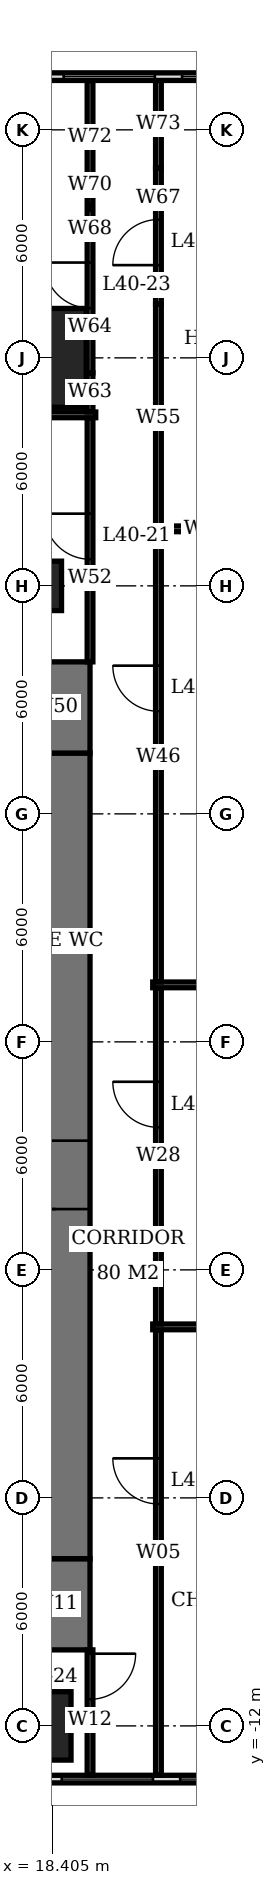
"""IFC4 building model, lengths in metres.
Left out: names, types, materials, properties, quantities, classifications, styles, units other than length and angle.
Written with IfcOpenShell. Run it as: python <this file> out.ifc"""

import sys

from ifc_helpers import new_model, si_unit, direction, frame, frame_2d, origin, origin_2d, place, context, subcontext, project, spatial, rectangle, extrude, element, fill, save


model = new_model("IFC4")
c1 = context("Model", 3, precision=1e-05, world=origin(), true_north=direction((0.0, 1.0)))
c2 = subcontext(c1, "Body", "Model", "MODEL_VIEW")
j1 = project(units=[si_unit("LENGTHUNIT", "METRE"), si_unit("PLANEANGLEUNIT", "RADIAN")], contexts=[c1])
p1 = place(None, origin())
s1 = spatial("IfcSite", under=j1, at=p1, CompositionType="ELEMENT")
p2 = place(p1, origin())
s2 = spatial("IfcBuilding", under=s1, at=p2, CompositionType="ELEMENT")
p3 = place(p2, frame((0.0, 0.0, 164.0)))
s3 = spatial("IfcBuildingStorey", under=s2, at=p3, CompositionType="ELEMENT", Elevation=164.0)
p4 = place(p3, frame((18.0, -12.0, 0.0), z_axis=(0.0, 0.0, 1.0), x_axis=(1.0, 0.0, 0.0)))
e1 = element("IfcColumn", 1, at=p4, inside=s3, PredefinedType="COLUMN", context=c2, shape_type="SweptSolid", body=[
    extrude(rectangle(XDim=1.8, YDim=1.8, at=origin_2d()), origin(), (0.0, 0.0, 1.0), 5.4),
])
p5 = place(p3, frame((18.0, 18.0, 0.0), z_axis=(0.0, 0.0, 1.0), x_axis=(1.0, 0.0, 0.0)))
e2 = element("IfcColumn", 2, at=p5, inside=s3, PredefinedType="COLUMN", context=c2, shape_type="SweptSolid", body=[
    extrude(rectangle(XDim=1.3, YDim=1.3, at=origin_2d()), origin(), (0.0, 0.0, 1.0), 5.4),
])
p6 = place(p3, frame((18.0, 24.0, 0.0), z_axis=(0.0, 0.0, 1.0), x_axis=(1.0, 0.0, 0.0)))
e3 = element("IfcColumn", 3, at=p6, inside=s3, PredefinedType="COLUMN", context=c2, shape_type="SweptSolid", body=[
    extrude(rectangle(XDim=2.6, YDim=2.6, at=origin_2d()), origin(), (0.0, 0.0, 1.0), 5.4),
])
p7 = place(p3, frame((18.5, -7.6, 0.0), z_axis=(0.0, 0.0, 1.0), x_axis=(0.0, 1.0, 0.0)))
e4 = element("IfcWall", 4, at=p7, inside=s3, PredefinedType="SHEAR", context=c2, shape_type="SweptSolid", body=[
    extrude(rectangle(XDim=21.2, YDim=1.8, at=frame_2d((10.6, 0.0))), origin(), (0.0, 0.0, 1.0), 5.4),
])
p8 = place(p7, frame((9.2, 0.0, 0.0)))
e5 = element("IfcOpeningElement", 5, at=p8, cuts=e4, PredefinedType="OPENING", context=c2, shape_type="SweptSolid", body=[
    extrude(rectangle(XDim=1.8, YDim=2.4, at=frame_2d((0.9, 1.2))), frame((0.0, 0.91, 0.0), z_axis=(0.0, -1.0, 0.0), x_axis=(1.0, 0.0, 0.0)), (0.0, 0.0, 1.0), 1.82),
])
for number, where, z_axis, x_axis in (
    (6, (18.5, -10.0, 0.0), (0.0, 0.0, 1.0), (0.0, 1.0, 0.0)),
    (7, (18.5, 13.6, 0.0), (0.0, 0.0, 1.0), (0.0, 1.0, 0.0)),
):
    element("IfcWall", number, at=place(p3, frame(where, z_axis=z_axis, x_axis=x_axis)), inside=s3, PredefinedType="SHEAR", context=c2, shape_type="SweptSolid", body=[
        extrude(rectangle(XDim=2.4, YDim=1.8, at=frame_2d((1.2, 0.0))), origin(), (0.0, 0.0, 1.0), 5.4),
    ])
p9 = place(p3, frame((-6.63, -13.4, 0.0), z_axis=(0.0, 0.0, 1.0), x_axis=(1.0, 0.0, 0.0)))
e8 = element("IfcWall", 8, at=p9, inside=s3, PredefinedType="USERDEFINED", context=c2, shape_type="SweptSolid", body=[
    extrude(rectangle(XDim=31.26, YDim=0.2, at=frame_2d((15.63, 0.0))), origin(), (0.0, 0.0, 1.0), 5.4),
])
p10 = place(p9, frame((0.358, 0.0, 0.6)))
e9 = element("IfcOpeningElement", 9, at=p10, cuts=e8, PredefinedType="OPENING", context=c2, shape_type="SweptSolid", body=[
    extrude(rectangle(XDim=2.4, YDim=3.0, at=frame_2d((1.2, 1.5))), frame((0.0, 0.11, 0.0), z_axis=(0.0, -1.0, 0.0), x_axis=(1.0, 0.0, 0.0)), (0.0, 0.0, 1.0), 0.22),
])
p11 = place(p9, frame((3.474, 0.0, 0.6)))
e10 = element("IfcOpeningElement", 10, at=p11, cuts=e8, PredefinedType="OPENING", context=c2, shape_type="SweptSolid", body=[
    extrude(rectangle(XDim=2.4, YDim=3.0, at=frame_2d((1.2, 1.5))), frame((0.0, 0.11, 0.0), z_axis=(0.0, -1.0, 0.0), x_axis=(1.0, 0.0, 0.0)), (0.0, 0.0, 1.0), 0.22),
])
p12 = place(p9, frame((6.59, 0.0, 0.6)))
e11 = element("IfcOpeningElement", 11, at=p12, cuts=e8, PredefinedType="OPENING", context=c2, shape_type="SweptSolid", body=[
    extrude(rectangle(XDim=2.4, YDim=3.0, at=frame_2d((1.2, 1.5))), frame((0.0, 0.11, 0.0), z_axis=(0.0, -1.0, 0.0), x_axis=(1.0, 0.0, 0.0)), (0.0, 0.0, 1.0), 0.22),
])
p13 = place(p9, frame((9.706, 0.0, 0.6)))
e12 = element("IfcOpeningElement", 12, at=p13, cuts=e8, PredefinedType="OPENING", context=c2, shape_type="SweptSolid", body=[
    extrude(rectangle(XDim=2.4, YDim=3.0, at=frame_2d((1.2, 1.5))), frame((0.0, 0.11, 0.0), z_axis=(0.0, -1.0, 0.0), x_axis=(1.0, 0.0, 0.0)), (0.0, 0.0, 1.0), 0.22),
])
p14 = place(p9, frame((13.572, 0.0, 0.0)))
e13 = element("IfcOpeningElement", 13, at=p14, cuts=e8, PredefinedType="OPENING", context=c2, shape_type="SweptSolid", body=[
    extrude(rectangle(XDim=1.0, YDim=2.1, at=frame_2d((0.5, 1.05))), frame((0.0, 0.11, 0.0), z_axis=(0.0, -1.0, 0.0), x_axis=(1.0, 0.0, 0.0)), (0.0, 0.0, 1.0), 0.22),
])
p15 = place(p9, frame((15.938, 0.0, 0.6)))
e14 = element("IfcOpeningElement", 14, at=p15, cuts=e8, PredefinedType="OPENING", context=c2, shape_type="SweptSolid", body=[
    extrude(rectangle(XDim=2.4, YDim=3.0, at=frame_2d((1.2, 1.5))), frame((0.0, 0.11, 0.0), z_axis=(0.0, -1.0, 0.0), x_axis=(1.0, 0.0, 0.0)), (0.0, 0.0, 1.0), 0.22),
])
p16 = place(p9, frame((19.054, 0.0, 0.6)))
e15 = element("IfcOpeningElement", 15, at=p16, cuts=e8, PredefinedType="OPENING", context=c2, shape_type="SweptSolid", body=[
    extrude(rectangle(XDim=2.4, YDim=3.0, at=frame_2d((1.2, 1.5))), frame((0.0, 0.11, 0.0), z_axis=(0.0, -1.0, 0.0), x_axis=(1.0, 0.0, 0.0)), (0.0, 0.0, 1.0), 0.22),
])
p17 = place(p9, frame((22.17, 0.0, 0.6)))
e16 = element("IfcOpeningElement", 16, at=p17, cuts=e8, PredefinedType="OPENING", context=c2, shape_type="SweptSolid", body=[
    extrude(rectangle(XDim=2.4, YDim=3.0, at=frame_2d((1.2, 1.5))), frame((0.0, 0.11, 0.0), z_axis=(0.0, -1.0, 0.0), x_axis=(1.0, 0.0, 0.0)), (0.0, 0.0, 1.0), 0.22),
])
p18 = place(p9, frame((25.286, 0.0, 0.6)))
e17 = element("IfcOpeningElement", 17, at=p18, cuts=e8, PredefinedType="OPENING", context=c2, shape_type="SweptSolid", body=[
    extrude(rectangle(XDim=2.4, YDim=3.0, at=frame_2d((1.2, 1.5))), frame((0.0, 0.11, 0.0), z_axis=(0.0, -1.0, 0.0), x_axis=(1.0, 0.0, 0.0)), (0.0, 0.0, 1.0), 0.22),
])
p19 = place(p9, frame((28.402, 0.0, 0.6)))
e18 = element("IfcOpeningElement", 18, at=p19, cuts=e8, PredefinedType="OPENING", context=c2, shape_type="SweptSolid", body=[
    extrude(rectangle(XDim=2.4, YDim=3.0, at=frame_2d((1.2, 1.5))), frame((0.0, 0.11, 0.0), z_axis=(0.0, -1.0, 0.0), x_axis=(1.0, 0.0, 0.0)), (0.0, 0.0, 1.0), 0.22),
])
p20 = place(p3, frame((24.58, 31.4, 0.0), z_axis=(0.0, 0.0, 1.0), x_axis=(-1.0, 0.0, 0.0)))
e19 = element("IfcWall", 19, at=p20, inside=s3, PredefinedType="USERDEFINED", context=c2, shape_type="SweptSolid", body=[
    extrude(rectangle(XDim=31.16, YDim=0.2, at=frame_2d((15.58, 0.0))), origin(), (0.0, 0.0, 1.0), 5.4),
])
p21 = place(p20, frame((0.358, 0.0, 0.6)))
e20 = element("IfcOpeningElement", 20, at=p21, cuts=e19, PredefinedType="OPENING", context=c2, shape_type="SweptSolid", body=[
    extrude(rectangle(XDim=2.4, YDim=3.0, at=frame_2d((1.2, 1.5))), frame((0.0, 0.11, 0.0), z_axis=(0.0, -1.0, 0.0), x_axis=(1.0, 0.0, 0.0)), (0.0, 0.0, 1.0), 0.22),
])
p22 = place(p20, frame((3.474, 0.0, 0.6)))
e21 = element("IfcOpeningElement", 21, at=p22, cuts=e19, PredefinedType="OPENING", context=c2, shape_type="SweptSolid", body=[
    extrude(rectangle(XDim=2.4, YDim=3.0, at=frame_2d((1.2, 1.5))), frame((0.0, 0.11, 0.0), z_axis=(0.0, -1.0, 0.0), x_axis=(1.0, 0.0, 0.0)), (0.0, 0.0, 1.0), 0.22),
])
p23 = place(p20, frame((6.59, 0.0, 0.6)))
e22 = element("IfcOpeningElement", 22, at=p23, cuts=e19, PredefinedType="OPENING", context=c2, shape_type="SweptSolid", body=[
    extrude(rectangle(XDim=2.4, YDim=3.0, at=frame_2d((1.2, 1.5))), frame((0.0, 0.11, 0.0), z_axis=(0.0, -1.0, 0.0), x_axis=(1.0, 0.0, 0.0)), (0.0, 0.0, 1.0), 0.22),
])
p24 = place(p20, frame((9.706, 0.0, 0.6)))
e23 = element("IfcOpeningElement", 23, at=p24, cuts=e19, PredefinedType="OPENING", context=c2, shape_type="SweptSolid", body=[
    extrude(rectangle(XDim=2.4, YDim=3.0, at=frame_2d((1.2, 1.5))), frame((0.0, 0.11, 0.0), z_axis=(0.0, -1.0, 0.0), x_axis=(1.0, 0.0, 0.0)), (0.0, 0.0, 1.0), 0.22),
])
p25 = place(p20, frame((12.822, 0.0, 0.6)))
e24 = element("IfcOpeningElement", 24, at=p25, cuts=e19, PredefinedType="OPENING", context=c2, shape_type="SweptSolid", body=[
    extrude(rectangle(XDim=2.4, YDim=3.0, at=frame_2d((1.2, 1.5))), frame((0.0, 0.11, 0.0), z_axis=(0.0, -1.0, 0.0), x_axis=(1.0, 0.0, 0.0)), (0.0, 0.0, 1.0), 0.22),
])
p26 = place(p20, frame((15.938, 0.0, 0.6)))
e25 = element("IfcOpeningElement", 25, at=p26, cuts=e19, PredefinedType="OPENING", context=c2, shape_type="SweptSolid", body=[
    extrude(rectangle(XDim=2.4, YDim=3.0, at=frame_2d((1.2, 1.5))), frame((0.0, 0.11, 0.0), z_axis=(0.0, -1.0, 0.0), x_axis=(1.0, 0.0, 0.0)), (0.0, 0.0, 1.0), 0.22),
])
p27 = place(p20, frame((19.054, 0.0, 0.6)))
e26 = element("IfcOpeningElement", 26, at=p27, cuts=e19, PredefinedType="OPENING", context=c2, shape_type="SweptSolid", body=[
    extrude(rectangle(XDim=2.4, YDim=3.0, at=frame_2d((1.2, 1.5))), frame((0.0, 0.11, 0.0), z_axis=(0.0, -1.0, 0.0), x_axis=(1.0, 0.0, 0.0)), (0.0, 0.0, 1.0), 0.22),
])
p28 = place(p20, frame((22.17, 0.0, 0.6)))
e27 = element("IfcOpeningElement", 27, at=p28, cuts=e19, PredefinedType="OPENING", context=c2, shape_type="SweptSolid", body=[
    extrude(rectangle(XDim=2.4, YDim=3.0, at=frame_2d((1.2, 1.5))), frame((0.0, 0.11, 0.0), z_axis=(0.0, -1.0, 0.0), x_axis=(1.0, 0.0, 0.0)), (0.0, 0.0, 1.0), 0.22),
])
p29 = place(p20, frame((25.286, 0.0, 0.6)))
e28 = element("IfcOpeningElement", 28, at=p29, cuts=e19, PredefinedType="OPENING", context=c2, shape_type="SweptSolid", body=[
    extrude(rectangle(XDim=2.4, YDim=3.0, at=frame_2d((1.2, 1.5))), frame((0.0, 0.11, 0.0), z_axis=(0.0, -1.0, 0.0), x_axis=(1.0, 0.0, 0.0)), (0.0, 0.0, 1.0), 0.22),
])
p30 = place(p20, frame((28.402, 0.0, 0.6)))
e29 = element("IfcOpeningElement", 29, at=p30, cuts=e19, PredefinedType="OPENING", context=c2, shape_type="SweptSolid", body=[
    extrude(rectangle(XDim=2.4, YDim=3.0, at=frame_2d((1.2, 1.5))), frame((0.0, 0.11, 0.0), z_axis=(0.0, -1.0, 0.0), x_axis=(1.0, 0.0, 0.0)), (0.0, 0.0, 1.0), 0.22),
])
p31 = place(p3, frame((4.575, 22.5, 0.0), z_axis=(0.0, 0.0, 1.0), x_axis=(1.0, 0.0, 0.0)))
e30 = element("IfcWall", 30, at=p31, inside=s3, PredefinedType="PARTITIONING", context=c2, shape_type="SweptSolid", body=[
    extrude(rectangle(XDim=14.975, YDim=0.15, at=frame_2d((7.488, 0.0))), origin(), (0.0, 0.0, 1.0), 5.15),
])
p32 = place(p3, frame((19.4, -10.0, 0.0), z_axis=(0.0, 0.0, 1.0), x_axis=(0.0, -1.0, 0.0)))
e31 = element("IfcWall", 31, at=p32, inside=s3, PredefinedType="PARTITIONING", context=c2, shape_type="SweptSolid", body=[
    extrude(rectangle(XDim=3.3, YDim=0.15, at=frame_2d((1.65, 0.0))), origin(), (0.0, 0.0, 1.0), 5.15),
])
p33 = place(p32, frame((0.1, 0.0, 0.0)))
e32 = element("IfcOpeningElement", 32, at=p33, cuts=e31, PredefinedType="OPENING", context=c2, shape_type="SweptSolid", body=[
    extrude(rectangle(XDim=1.2, YDim=2.4, at=frame_2d((0.6, 1.2))), frame((0.0, 0.085, 0.0), z_axis=(0.0, -1.0, 0.0), x_axis=(1.0, 0.0, 0.0)), (0.0, 0.0, 1.0), 0.17),
])
p34 = place(p3, frame((19.4, 16.0, 0.0), z_axis=(0.0, 0.0, 1.0), x_axis=(0.0, 1.0, 0.0)))
e33 = element("IfcWall", 33, at=p34, inside=s3, PredefinedType="PARTITIONING", context=c2, shape_type="SweptSolid", body=[
    extrude(rectangle(XDim=6.425, YDim=0.15, at=frame_2d((3.212, 0.0))), origin(), (0.0, 0.0, 1.0), 5.15),
])
p35 = place(p34, frame((2.7, 0.0, 0.0)))
e34 = element("IfcOpeningElement", 34, at=p35, cuts=e33, PredefinedType="OPENING", context=c2, shape_type="SweptSolid", body=[
    extrude(rectangle(XDim=1.2, YDim=2.4, at=frame_2d((0.6, 1.2))), frame((0.0, 0.085, 0.0), z_axis=(0.0, -1.0, 0.0), x_axis=(1.0, 0.0, 0.0)), (0.0, 0.0, 1.0), 0.17),
])
p36 = place(p3, frame((19.4, 22.575, 0.0), z_axis=(0.0, 0.0, 1.0), x_axis=(0.0, 1.0, 0.0)))
e35 = element("IfcWall", 35, at=p36, inside=s3, PredefinedType="PARTITIONING", context=c2, shape_type="SweptSolid", body=[
    extrude(rectangle(XDim=1.033, YDim=0.15, at=frame_2d((0.517, 0.0))), origin(), (0.0, 0.0, 1.0), 5.15),
])
p37 = place(p3, frame((19.4, 23.608, 0.0), z_axis=(0.0, 0.0, 1.0), x_axis=(0.0, 1.0, 0.0)))
e36 = element("IfcWall", 36, at=p37, inside=s3, PredefinedType="PARTITIONING", context=c2, shape_type="SweptSolid", body=[
    extrude(rectangle(XDim=3.584, YDim=0.15, at=frame_2d((1.792, 0.0))), origin(), (0.0, 0.0, 1.0), 4.15),
])
p38 = place(p37, frame((1.7, 0.0, 0.0)))
e37 = element("IfcOpeningElement", 37, at=p38, cuts=e36, PredefinedType="OPENING", context=c2, shape_type="SweptSolid", body=[
    extrude(rectangle(XDim=1.2, YDim=2.4, at=frame_2d((0.6, 1.2))), frame((0.0, 0.085, 0.0), z_axis=(0.0, -1.0, 0.0), x_axis=(1.0, 0.0, 0.0)), (0.0, 0.0, 1.0), 0.17),
])
p39 = place(p3, frame((19.4, 27.192, 0.0), z_axis=(0.0, 0.0, 1.0), x_axis=(0.0, 1.0, 0.0)))
e38 = element("IfcWall", 38, at=p39, inside=s3, PredefinedType="PARTITIONING", context=c2, shape_type="SweptSolid", body=[
    extrude(rectangle(XDim=0.398, YDim=0.15, at=frame_2d((0.199, 0.0))), origin(), (0.0, 0.0, 1.0), 5.15),
])
p40 = place(p3, frame((19.4, 27.59, 0.0), z_axis=(0.0, 0.0, 1.0), x_axis=(0.0, 1.0, 0.0)))
e39 = element("IfcWall", 39, at=p40, inside=s3, PredefinedType="PARTITIONING", context=c2, shape_type="SweptSolid", body=[
    extrude(rectangle(XDim=0.72, YDim=0.15, at=frame_2d((0.36, 0.0))), origin(), (0.0, 0.0, 1.0), 4.15),
])
p41 = place(p3, frame((19.4, 28.31, 0.0), z_axis=(0.0, 0.0, 1.0), x_axis=(0.0, 1.0, 0.0)))
e40 = element("IfcWall", 40, at=p41, inside=s3, PredefinedType="PARTITIONING", context=c2, shape_type="SweptSolid", body=[
    extrude(rectangle(XDim=2.99, YDim=0.15, at=frame_2d((1.495, 0.0))), origin(), (0.0, 0.0, 1.0), 5.15),
])
p42 = place(p3, frame((21.2, -13.3, 0.0), z_axis=(0.0, 0.0, 1.0), x_axis=(0.0, 1.0, 0.0)))
e41 = element("IfcWall", 41, at=p42, inside=s3, PredefinedType="PARTITIONING", context=c2, shape_type="SweptSolid", body=[
    extrude(rectangle(XDim=11.725, YDim=0.15, at=frame_2d((5.863, 0.0))), origin(), (0.0, 0.0, 1.0), 5.15),
])
p43 = place(p42, frame((7.14, 0.0, 0.0)))
e42 = element("IfcOpeningElement", 42, at=p43, cuts=e41, PredefinedType="OPENING", context=c2, shape_type="SweptSolid", body=[
    extrude(rectangle(XDim=1.2, YDim=2.4, at=frame_2d((0.6, 1.2))), frame((0.0, 0.085, 0.0), z_axis=(0.0, -1.0, 0.0), x_axis=(1.0, 0.0, 0.0)), (0.0, 0.0, 1.0), 0.17),
])
p44 = place(p3, frame((21.2, -1.425, 0.0), z_axis=(0.0, 0.0, 1.0), x_axis=(0.0, 1.0, 0.0)))
e43 = element("IfcWall", 43, at=p44, inside=s3, PredefinedType="PARTITIONING", context=c2, shape_type="SweptSolid", body=[
    extrude(rectangle(XDim=8.85, YDim=0.15, at=frame_2d((4.425, 0.0))), origin(), (0.0, 0.0, 1.0), 5.15),
])
p45 = place(p44, frame((5.175, 0.0, 0.0)))
e44 = element("IfcOpeningElement", 44, at=p45, cuts=e43, PredefinedType="OPENING", context=c2, shape_type="SweptSolid", body=[
    extrude(rectangle(XDim=1.2, YDim=2.4, at=frame_2d((0.6, 1.2))), frame((0.0, 0.085, 0.0), z_axis=(0.0, -1.0, 0.0), x_axis=(1.0, 0.0, 0.0)), (0.0, 0.0, 1.0), 0.17),
])
p46 = place(p3, frame((21.05, -1.5, 0.0), z_axis=(0.0, 0.0, 1.0), x_axis=(1.0, 0.0, 0.0)))
e45 = element("IfcWall", 45, at=p46, inside=s3, PredefinedType="PARTITIONING", context=c2, shape_type="SweptSolid", body=[
    extrude(rectangle(XDim=6.54, YDim=0.15, at=frame_2d((3.27, 0.0))), origin(), (0.0, 0.0, 1.0), 5.15),
])
p47 = place(p3, frame((21.2, 7.575, 0.0), z_axis=(0.0, 0.0, 1.0), x_axis=(0.0, 1.0, 0.0)))
e46 = element("IfcWall", 46, at=p47, inside=s3, PredefinedType="PARTITIONING", context=c2, shape_type="SweptSolid", body=[
    extrude(rectangle(XDim=11.85, YDim=0.15, at=frame_2d((5.925, 0.0))), origin(), (0.0, 0.0, 1.0), 5.15),
])
p48 = place(p47, frame((7.125, 0.0, 0.0)))
e47 = element("IfcOpeningElement", 47, at=p48, cuts=e46, PredefinedType="OPENING", context=c2, shape_type="SweptSolid", body=[
    extrude(rectangle(XDim=1.2, YDim=2.4, at=frame_2d((0.6, 1.2))), frame((0.0, 0.085, 0.0), z_axis=(0.0, -1.0, 0.0), x_axis=(1.0, 0.0, 0.0)), (0.0, 0.0, 1.0), 0.17),
])
p49 = place(p3, frame((21.05, 7.5, 0.0), z_axis=(0.0, 0.0, 1.0), x_axis=(1.0, 0.0, 0.0)))
e48 = element("IfcWall", 48, at=p49, inside=s3, PredefinedType="PARTITIONING", context=c2, shape_type="SweptSolid", body=[
    extrude(rectangle(XDim=6.54, YDim=0.15, at=frame_2d((3.27, 0.0))), origin(), (0.0, 0.0, 1.0), 5.15),
])
p50 = place(p3, frame((21.2, 19.425, 0.0), z_axis=(0.0, 0.0, 1.0), x_axis=(0.0, 1.0, 0.0)))
e49 = element("IfcWall", 49, at=p50, inside=s3, PredefinedType="PARTITIONING", context=c2, shape_type="SweptSolid", body=[
    extrude(rectangle(XDim=5.983, YDim=0.15, at=frame_2d((2.991, 0.0))), origin(), (0.0, 0.0, 1.0), 5.15),
])
p51 = place(p3, frame((21.2, 25.408, 0.0), z_axis=(0.0, 0.0, 1.0), x_axis=(0.0, 1.0, 0.0)))
e50 = element("IfcWall", 50, at=p51, inside=s3, PredefinedType="PARTITIONING", context=c2, shape_type="SweptSolid", body=[
    extrude(rectangle(XDim=3.584, YDim=0.15, at=frame_2d((1.792, 0.0))), origin(), (0.0, 0.0, 1.0), 4.15),
])
p52 = place(p51, frame((1.032, 0.0, 0.0)))
e51 = element("IfcOpeningElement", 51, at=p52, cuts=e50, PredefinedType="OPENING", context=c2, shape_type="SweptSolid", body=[
    extrude(rectangle(XDim=1.2, YDim=2.4, at=frame_2d((0.6, 1.2))), frame((0.0, 0.085, 0.0), z_axis=(0.0, -1.0, 0.0), x_axis=(1.0, 0.0, 0.0)), (0.0, 0.0, 1.0), 0.17),
])
p53 = place(p3, frame((21.2, 28.992, 0.0), z_axis=(0.0, 0.0, 1.0), x_axis=(0.0, 1.0, 0.0)))
e52 = element("IfcWall", 52, at=p53, inside=s3, PredefinedType="PARTITIONING", context=c2, shape_type="SweptSolid", body=[
    extrude(rectangle(XDim=2.308, YDim=0.15, at=frame_2d((1.154, 0.0))), origin(), (0.0, 0.0, 1.0), 5.15),
])
p54 = place(p3, frame((21.2, 19.5, 0.0), z_axis=(0.0, 0.0, 1.0), x_axis=(1.0, 0.0, 0.0)))
e53 = element("IfcWall", 53, at=p54, inside=s3, PredefinedType="PARTITIONING", context=c2, shape_type="SweptSolid", body=[
    extrude(rectangle(XDim=2.508, YDim=0.15, at=frame_2d((1.254, 0.0))), origin(), (0.0, 0.0, 1.0), 5.15),
])
p55 = place(p18, origin())
e54 = element("IfcWindow", 54, at=p55, inside=s3, PartitioningType="SINGLE_PANEL", PredefinedType="USERDEFINED", context=c2, shape_type="SweptSolid", body=[
    extrude(rectangle(XDim=2.4, YDim=3.0, at=frame_2d((1.2, 1.5))), frame((0.0, 0.03, 0.0), z_axis=(0.0, -1.0, 0.0), x_axis=(1.0, 0.0, 0.0)), (0.0, 0.0, 1.0), 0.06),
])
fill(e17, e54)
p56 = place(p19, origin())
e55 = element("IfcWindow", 55, at=p56, inside=s3, PartitioningType="SINGLE_PANEL", PredefinedType="USERDEFINED", context=c2, shape_type="SweptSolid", body=[
    extrude(rectangle(XDim=2.4, YDim=3.0, at=frame_2d((1.2, 1.5))), frame((0.0, 0.03, 0.0), z_axis=(0.0, -1.0, 0.0), x_axis=(1.0, 0.0, 0.0)), (0.0, 0.0, 1.0), 0.06),
])
fill(e18, e55)
p57 = place(p21, origin())
e56 = element("IfcWindow", 56, at=p57, inside=s3, PartitioningType="SINGLE_PANEL", PredefinedType="USERDEFINED", context=c2, shape_type="SweptSolid", body=[
    extrude(rectangle(XDim=2.4, YDim=3.0, at=frame_2d((1.2, 1.5))), frame((0.0, 0.03, 0.0), z_axis=(0.0, -1.0, 0.0), x_axis=(1.0, 0.0, 0.0)), (0.0, 0.0, 1.0), 0.06),
])
fill(e20, e56)
p58 = place(p22, origin())
e57 = element("IfcWindow", 57, at=p58, inside=s3, PartitioningType="SINGLE_PANEL", PredefinedType="USERDEFINED", context=c2, shape_type="SweptSolid", body=[
    extrude(rectangle(XDim=2.4, YDim=3.0, at=frame_2d((1.2, 1.5))), frame((0.0, 0.03, 0.0), z_axis=(0.0, -1.0, 0.0), x_axis=(1.0, 0.0, 0.0)), (0.0, 0.0, 1.0), 0.06),
])
fill(e21, e57)
p59 = place(p8, origin())
e58 = element("IfcDoor", 58, at=p59, inside=s3, OperationType="DOUBLE_DOOR_SINGLE_SWING", PredefinedType="DOOR", context=c2, shape_type="SweptSolid", body=[
    extrude(rectangle(XDim=1.8, YDim=2.4, at=frame_2d((0.9, 1.2))), frame((0.0, 0.025, 0.0), z_axis=(0.0, -1.0, 0.0), x_axis=(1.0, 0.0, 0.0)), (0.0, 0.0, 1.0), 0.05),
])
fill(e5, e58)
p60 = place(p43, origin())
e59 = element("IfcDoor", 59, at=p60, inside=s3, OperationType="SINGLE_SWING_RIGHT", PredefinedType="DOOR", context=c2, shape_type="SweptSolid", body=[
    extrude(rectangle(XDim=1.2, YDim=2.4, at=frame_2d((0.6, 1.2))), frame((0.0, 0.025, 0.0), z_axis=(0.0, -1.0, 0.0), x_axis=(1.0, 0.0, 0.0)), (0.0, 0.0, 1.0), 0.05),
])
fill(e42, e59)
p61 = place(p45, origin())
e60 = element("IfcDoor", 60, at=p61, inside=s3, OperationType="SINGLE_SWING_RIGHT", PredefinedType="DOOR", context=c2, shape_type="SweptSolid", body=[
    extrude(rectangle(XDim=1.2, YDim=2.4, at=frame_2d((0.6, 1.2))), frame((0.0, 0.025, 0.0), z_axis=(0.0, -1.0, 0.0), x_axis=(1.0, 0.0, 0.0)), (0.0, 0.0, 1.0), 0.05),
])
fill(e44, e60)
p62 = place(p48, origin())
e61 = element("IfcDoor", 61, at=p62, inside=s3, OperationType="SINGLE_SWING_RIGHT", PredefinedType="DOOR", context=c2, shape_type="SweptSolid", body=[
    extrude(rectangle(XDim=1.2, YDim=2.4, at=frame_2d((0.6, 1.2))), frame((0.0, 0.025, 0.0), z_axis=(0.0, -1.0, 0.0), x_axis=(1.0, 0.0, 0.0)), (0.0, 0.0, 1.0), 0.05),
])
fill(e47, e61)
p63 = place(p52, origin())
e62 = element("IfcDoor", 62, at=p63, inside=s3, OperationType="SINGLE_SWING_LEFT", PredefinedType="DOOR", context=c2, shape_type="SweptSolid", body=[
    extrude(rectangle(XDim=1.2, YDim=2.4, at=frame_2d((0.6, 1.2))), frame((0.0, 0.025, 0.0), z_axis=(0.0, -1.0, 0.0), x_axis=(1.0, 0.0, 0.0)), (0.0, 0.0, 1.0), 0.05),
])
fill(e51, e62)
p64 = place(p35, origin())
e63 = element("IfcDoor", 63, at=p64, inside=s3, OperationType="SINGLE_SWING_RIGHT", PredefinedType="DOOR", context=c2, shape_type="SweptSolid", body=[
    extrude(rectangle(XDim=1.2, YDim=2.4, at=frame_2d((0.6, 1.2))), frame((0.0, 0.025, 0.0), z_axis=(0.0, -1.0, 0.0), x_axis=(1.0, 0.0, 0.0)), (0.0, 0.0, 1.0), 0.05),
])
fill(e34, e63)
p65 = place(p38, origin())
e64 = element("IfcDoor", 64, at=p65, inside=s3, OperationType="SINGLE_SWING_RIGHT", PredefinedType="DOOR", context=c2, shape_type="SweptSolid", body=[
    extrude(rectangle(XDim=1.2, YDim=2.4, at=frame_2d((0.6, 1.2))), frame((0.0, 0.025, 0.0), z_axis=(0.0, -1.0, 0.0), x_axis=(1.0, 0.0, 0.0)), (0.0, 0.0, 1.0), 0.05),
])
fill(e37, e64)
p66 = place(p33, origin())
e65 = element("IfcDoor", 65, at=p66, inside=s3, OperationType="SINGLE_SWING_LEFT", PredefinedType="DOOR", context=c2, shape_type="SweptSolid", body=[
    extrude(rectangle(XDim=1.2, YDim=2.4, at=frame_2d((0.6, 1.2))), frame((0.0, 0.025, 0.0), z_axis=(0.0, -1.0, 0.0), x_axis=(1.0, 0.0, 0.0)), (0.0, 0.0, 1.0), 0.05),
])
fill(e32, e65)
save(model, sys.argv[1])
